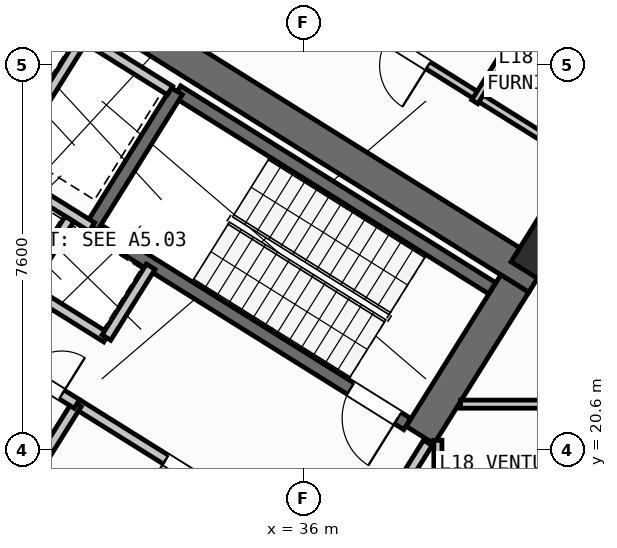
"""IFC4 building model, lengths in metres.
Left out: names, types, materials, properties, quantities, classifications, styles, units other than length and angle.
Written with IfcOpenShell. Run it as: python <this file> out.ifc"""

import sys

from ifc_helpers import new_model, si_unit, direction, frame, frame_2d, origin, origin_2d, place, context, subcontext, project, spatial, rectangle, hollow_rectangle, extrude, source, transform, mapped, element, fill, save


model = new_model("IFC4")
c1 = context("Model", 3, precision=1e-05, world=origin(), true_north=direction((0.0, 1.0)))
c2 = subcontext(c1, "Body", "Model", "MODEL_VIEW")
j1 = project(units=[si_unit("LENGTHUNIT", "METRE"), si_unit("PLANEANGLEUNIT", "RADIAN")], contexts=[c1])
p1 = place(None, origin())
s1 = spatial("IfcSite", under=j1, at=p1, CompositionType="ELEMENT")
p2 = place(p1, origin())
s2 = spatial("IfcBuilding", under=s1, at=p2, CompositionType="ELEMENT")
p3 = place(p2, frame((0.0, 0.0, 71.7)))
s3 = spatial("IfcBuildingStorey", under=s2, at=p3, CompositionType="ELEMENT", Elevation=71.7)
p4 = place(p3, frame((40.615, 23.983, 0.0), z_axis=(0.0, 0.0, 1.0), x_axis=(-0.848045953968, 0.529922692436, 0.0)))
e1 = element("IfcWall", 1, at=p4, inside=s3, PredefinedType="SHEAR", context=c2, shape_type="SweptSolid", body=[
    extrude(rectangle(XDim=13.24, YDim=0.65, at=frame_2d((6.62, 0.0))), origin(), (0.0, 0.0, 1.0), 4.52),
])
p5 = place(p3, frame((40.168, 23.88, 0.0), z_axis=(0.0, 0.0, 1.0), x_axis=(-0.529893103397, -0.8480644427, 0.0)))
e2 = element("IfcWall", 2, at=p5, inside=s3, PredefinedType="SHEAR", context=c2, shape_type="SweptSolid", body=[
    extrude(rectangle(XDim=3.525, YDim=0.65, at=frame_2d((1.763, 0.0))), origin(), (0.0, 0.0, 1.0), 4.52),
])
m1 = source(origin(), c2, "Body", "SweptSolid", [
    extrude(hollow_rectangle(XDim=1.0, YDim=1.0, WallThickness=0.04, at=origin_2d()), origin(), (0.0, 0.0, 1.0), 4.8),
])
p6 = place(p3, frame((40.783, 24.469, 0.0), z_axis=(0.0, 0.0, 1.0), x_axis=(-0.848048096156, 0.529919264233, 0.0)))
e3 = element("IfcColumn", 3, at=p6, inside=s3, PredefinedType="COLUMN", context=c2, shape_type="MappedRepresentation", body=[
    mapped(m1, transform((0.0, 0.0, 0.0), scale=1.0)),
])
p7 = place(p3, frame((31.76, 12.183, 0.0), z_axis=(0.0, 0.0, 1.0), x_axis=(-0.848047074256, 0.529920899612, 0.0)))
e4 = element("IfcWall", 4, at=p7, inside=s3, PredefinedType="STANDARD", context=c2, shape_type="SweptSolid", body=[
    extrude(rectangle(XDim=30.652, YDim=0.32, at=frame_2d((15.326, 0.0))), origin(), (0.0, 0.0, 1.0), 4.52),
])
p8 = place(p7, frame((20.241, 0.0, 0.0)))
e5 = element("IfcOpeningElement", 5, at=p8, cuts=e4, PredefinedType="OPENING", context=c2, shape_type="SweptSolid", body=[
    extrude(rectangle(XDim=1.2, YDim=2.15, at=frame_2d((0.6, 1.075))), frame((0.0, 0.17, 0.0), z_axis=(0.0, -1.0, 0.0), x_axis=(1.0, 0.0, 0.0)), (0.0, 0.0, 1.0), 0.34),
])
p9 = place(p7, frame((14.781, 0.0, 0.0)))
e6 = element("IfcOpeningElement", 6, at=p9, cuts=e4, PredefinedType="OPENING", context=c2, shape_type="SweptSolid", body=[
    extrude(rectangle(XDim=1.5, YDim=2.25, at=frame_2d((0.75, 1.125))), frame((0.0, 0.17, 0.0), z_axis=(0.0, -1.0, 0.0), x_axis=(1.0, 0.0, 0.0)), (0.0, 0.0, 1.0), 0.34),
])
p10 = place(p7, frame((1.84, 0.0, 0.75)))
e7 = element("IfcOpeningElement", 7, at=p10, cuts=e4, PredefinedType="OPENING", context=c2, shape_type="SweptSolid", body=[
    extrude(rectangle(XDim=2.4, YDim=1.6, at=frame_2d((1.2, 0.8))), frame((0.0, 0.17, 0.0), z_axis=(0.0, -1.0, 0.0), x_axis=(1.0, 0.0, 0.0)), (0.0, 0.0, 1.0), 0.34),
])
p11 = place(p7, frame((7.019, 0.0, 0.75)))
e8 = element("IfcOpeningElement", 8, at=p11, cuts=e4, PredefinedType="OPENING", context=c2, shape_type="SweptSolid", body=[
    extrude(rectangle(XDim=2.4, YDim=1.6, at=frame_2d((1.2, 0.8))), frame((0.0, 0.17, 0.0), z_axis=(0.0, -1.0, 0.0), x_axis=(1.0, 0.0, 0.0)), (0.0, 0.0, 1.0), 0.34),
])
p12 = place(p7, frame((25.841, 0.0, 0.95)))
e9 = element("IfcOpeningElement", 9, at=p12, cuts=e4, PredefinedType="OPENING", context=c2, shape_type="SweptSolid", body=[
    extrude(rectangle(XDim=1.2, YDim=1.4, at=frame_2d((0.6, 0.7))), frame((0.0, 0.17, 0.0), z_axis=(0.0, -1.0, 0.0), x_axis=(1.0, 0.0, 0.0)), (0.0, 0.0, 1.0), 0.34),
])
p13 = place(p3, frame((31.28, 18.261, 0.0), z_axis=(0.0, 0.0, 1.0), x_axis=(-0.848051618787, 0.529913626805, 0.0)))
e10 = element("IfcWall", 10, at=p13, inside=s3, PredefinedType="SHEAR", context=c2, shape_type="SweptSolid", body=[
    extrude(rectangle(XDim=7.46, YDim=0.26, at=frame_2d((3.73, 0.0))), origin(), (0.0, 0.0, 1.0), 4.52),
])
p14 = place(p13, frame((0.36, 0.0, 0.0)))
e11 = element("IfcOpeningElement", 11, at=p14, cuts=e10, PredefinedType="OPENING", context=c2, shape_type="SweptSolid", body=[
    extrude(rectangle(XDim=0.86, YDim=2.05, at=frame_2d((0.43, 1.025))), frame((0.0, 0.14, 0.0), z_axis=(0.0, -1.0, 0.0), x_axis=(1.0, 0.0, 0.0)), (0.0, 0.0, 1.0), 0.28),
])
p15 = place(p3, frame((39.721, 23.788, 0.0), z_axis=(0.0, 0.0, 1.0), x_axis=(-0.848054434086, 0.529909121291, 0.0)))
e12 = element("IfcWall", 12, at=p15, inside=s3, PredefinedType="SHEAR", context=c2, shape_type="SweptSolid", body=[
    extrude(rectangle(XDim=7.33, YDim=0.26, at=frame_2d((3.665, 0.0))), origin(), (0.0, 0.0, 1.0), 4.52),
])
p16 = place(p3, frame((38.046, 21.108, 0.0), z_axis=(0.0, 0.0, 1.0), x_axis=(-0.848054434086, 0.529909121291, 0.0)))
e13 = element("IfcWall", 13, at=p16, inside=s3, PredefinedType="SHEAR", context=c2, shape_type="SweptSolid", body=[
    extrude(rectangle(XDim=7.33, YDim=0.26, at=frame_2d((3.665, 0.0))), origin(), (0.0, 0.0, 1.0), 4.52),
])
p17 = place(p16, frame((0.22, 0.0, 0.0)))
e14 = element("IfcOpeningElement", 14, at=p17, cuts=e13, PredefinedType="OPENING", context=c2, shape_type="SweptSolid", body=[
    extrude(rectangle(XDim=1.1, YDim=2.1, at=frame_2d((0.55, 1.05))), frame((0.0, 0.14, 0.0), z_axis=(0.0, -1.0, 0.0), x_axis=(1.0, 0.0, 0.0)), (0.0, 0.0, 1.0), 0.28),
])
p18 = place(p3, frame((33.496, 27.677, 0.0), z_axis=(0.0, 0.0, 1.0), x_axis=(-0.529908658664, -0.84805472316, 0.0)))
e15 = element("IfcWall", 15, at=p18, inside=s3, PredefinedType="SHEAR", context=c2, shape_type="SweptSolid", body=[
    extrude(rectangle(XDim=3.16, YDim=0.26, at=frame_2d((1.58, 0.0))), origin(), (0.0, 0.0, 1.0), 4.52),
])
p19 = place(p3, frame((36.374, 18.474, 0.0), z_axis=(0.0, 0.0, 1.0), x_axis=(-0.848051071577, 0.529914502535, 0.0)))
e16 = element("IfcWall", 16, at=p19, inside=s3, PredefinedType="STANDARD", context=c2, shape_type="SweptSolid", body=[
    extrude(rectangle(XDim=5.718, YDim=0.2, at=frame_2d((2.859, 0.0))), origin(), (0.0, 0.0, 1.0), 4.51),
])
p20 = place(p19, frame((2.498, 0.0, 0.0)))
e17 = element("IfcOpeningElement", 17, at=p20, cuts=e16, PredefinedType="OPENING", context=c2, shape_type="SweptSolid", body=[
    extrude(rectangle(XDim=1.15, YDim=2.1, at=frame_2d((0.575, 1.05))), frame((0.0, 0.11, 0.0), z_axis=(0.0, -1.0, 0.0), x_axis=(1.0, 0.0, 0.0)), (0.0, 0.0, 1.0), 0.22),
])
p21 = place(p3, frame((31.822, 24.998, 0.0), z_axis=(0.0, 0.0, 1.0), x_axis=(-0.848058348634, 0.529902856485, 0.0)))
e18 = element("IfcWall", 18, at=p21, inside=s3, PredefinedType="STANDARD", context=c2, shape_type="SweptSolid", body=[
    extrude(rectangle(XDim=4.568, YDim=0.2, at=frame_2d((2.284, 0.0))), origin(), (0.0, 0.0, 1.0), 4.51),
])
p22 = place(p3, frame((32.108, 22.814, 0.0), z_axis=(0.0, 0.0, 1.0), x_axis=(-0.848042229521, 0.529928652696, 0.0)))
e19 = element("IfcWall", 19, at=p22, inside=s3, PredefinedType="STANDARD", context=c2, shape_type="SweptSolid", body=[
    extrude(rectangle(XDim=5.62, YDim=0.2, at=frame_2d((2.81, 0.0))), origin(), (0.0, 0.0, 1.0), 4.51),
])
p23 = place(p3, frame((32.982, 24.213, 0.0), z_axis=(0.0, 0.0, 1.0), x_axis=(-0.529839334948, -0.84809803628, 0.0)))
e20 = element("IfcWall", 20, at=p23, inside=s3, PredefinedType="STANDARD", context=c2, shape_type="SweptSolid", body=[
    extrude(rectangle(XDim=1.65, YDim=0.2, at=frame_2d((0.825, 0.0))), origin(), (0.0, 0.0, 1.0), 4.51),
])
p24 = place(p3, frame((31.645, 28.716, 0.0), z_axis=(0.0, 0.0, 1.0), x_axis=(-0.52986693015, -0.848080795876, 0.0)))
e21 = element("IfcWall", 21, at=p24, inside=s3, PredefinedType="STANDARD", context=c2, shape_type="SweptSolid", body=[
    extrude(rectangle(XDim=2.66, YDim=0.2, at=frame_2d((1.33, 0.0))), origin(), (0.0, 0.0, 1.0), 4.51),
])
p25 = place(p3, frame((33.363, 27.69, 0.0), z_axis=(0.0, 0.0, 1.0), x_axis=(-0.848053806312, 0.529910125964, 0.0)))
e22 = element("IfcWall", 22, at=p25, inside=s3, PredefinedType="STANDARD", context=c2, shape_type="SweptSolid", body=[
    extrude(rectangle(XDim=4.448, YDim=0.2, at=frame_2d((2.224, 0.0))), origin(), (0.0, 0.0, 1.0), 4.51),
])
p26 = place(p3, frame((31.379, 25.156, 0.0), z_axis=(0.0, 0.0, 1.0), x_axis=(-0.529998940003, -0.847998304005, 0.0)))
e23 = element("IfcWall", 23, at=p26, inside=s3, PredefinedType="STANDARD", context=c2, shape_type="SweptSolid", body=[
    extrude(rectangle(XDim=1.58, YDim=0.2, at=frame_2d((0.79, 0.0))), origin(), (0.0, 0.0, 1.0), 4.51),
])
p27 = place(p3, frame((31.525, 21.504, 0.0), z_axis=(0.0, 0.0, 1.0), x_axis=(-0.529907497854, -0.848055448493, 0.0)))
e24 = element("IfcWall", 24, at=p27, inside=s3, PredefinedType="STANDARD", context=c2, shape_type="SweptSolid", body=[
    extrude(rectangle(XDim=2.88, YDim=0.2, at=frame_2d((1.44, 0.0))), origin(), (0.0, 0.0, 1.0), 4.51),
])
p28 = place(p3, frame((31.525, 21.504, 0.0), z_axis=(0.0, 0.0, 1.0), x_axis=(-0.848044998614, 0.529924221305, 0.0)))
e25 = element("IfcWall", 25, at=p28, inside=s3, PredefinedType="STANDARD", context=c2, shape_type="SweptSolid", body=[
    extrude(rectangle(XDim=6.168, YDim=0.2, at=frame_2d((3.084, 0.0))), origin(), (0.0, 0.0, 1.0), 4.51),
])
p29 = place(p28, frame((4.4, 0.0, 0.0)))
e26 = element("IfcOpeningElement", 26, at=p29, cuts=e25, PredefinedType="OPENING", context=c2, shape_type="SweptSolid", body=[
    extrude(rectangle(XDim=0.86, YDim=2.05, at=frame_2d((0.43, 1.025))), frame((0.0, 0.11, 0.0), z_axis=(0.0, -1.0, 0.0), x_axis=(1.0, 0.0, 0.0)), (0.0, 0.0, 1.0), 0.22),
])
p30 = place(p28, frame((0.35, 0.0, 0.0)))
e27 = element("IfcOpeningElement", 27, at=p30, cuts=e25, PredefinedType="OPENING", context=c2, shape_type="SweptSolid", body=[
    extrude(rectangle(XDim=0.86, YDim=2.05, at=frame_2d((0.43, 1.025))), frame((0.0, 0.11, 0.0), z_axis=(0.0, -1.0, 0.0), x_axis=(1.0, 0.0, 0.0)), (0.0, 0.0, 1.0), 0.22),
])
p31 = place(p3, frame((41.936, 26.012, 0.0), z_axis=(0.0, 0.0, 1.0), x_axis=(-0.848051154596, 0.529914369676, 0.0)))
e28 = element("IfcWall", 28, at=p31, inside=s3, PredefinedType="PARTITIONING", context=c2, shape_type="SweptSolid", body=[
    extrude(rectangle(XDim=15.57, YDim=0.16, at=frame_2d((7.785, 0.0))), origin(), (0.0, 0.0, 1.0), 4.51),
])
p32 = place(p31, frame((4.1, 0.0, 0.0)))
e29 = element("IfcOpeningElement", 29, at=p32, cuts=e28, PredefinedType="OPENING", context=c2, shape_type="SweptSolid", body=[
    extrude(rectangle(XDim=0.96, YDim=2.08, at=frame_2d((0.48, 1.04))), frame((0.0, 0.09, 0.0), z_axis=(0.0, -1.0, 0.0), x_axis=(1.0, 0.0, 0.0)), (0.0, 0.0, 1.0), 0.18),
])
p33 = place(p31, frame((8.2, 0.0, 0.0)))
e30 = element("IfcOpeningElement", 30, at=p33, cuts=e28, PredefinedType="OPENING", context=c2, shape_type="SweptSolid", body=[
    extrude(rectangle(XDim=1.7, YDim=2.2, at=frame_2d((0.85, 1.1))), frame((0.0, 0.09, 0.0), z_axis=(0.0, -1.0, 0.0), x_axis=(1.0, 0.0, 0.0)), (0.0, 0.0, 1.0), 0.18),
])
p34 = place(p3, frame((40.512, 29.281, 0.0), z_axis=(0.0, 0.0, 1.0), x_axis=(-0.529947607416, -0.848030384712, 0.0)))
e31 = element("IfcWall", 31, at=p34, inside=s3, PredefinedType="PLUMBINGWALL", context=c2, shape_type="SweptSolid", body=[
    extrude(rectangle(XDim=2.138, YDim=0.14, at=frame_2d((1.069, 0.0))), origin(), (0.0, 0.0, 1.0), 4.51),
])
p35 = place(p3, frame((38.451, 20.737, 0.0), z_axis=(0.0, 0.0, 1.0), x_axis=(-0.529924799939, -0.848044637038, 0.0)))
e32 = element("IfcWall", 32, at=p35, inside=s3, PredefinedType="STANDARD", context=c2, shape_type="SweptSolid", body=[
    extrude(rectangle(XDim=2.96, YDim=0.2, at=frame_2d((1.48, 0.0))), origin(), (0.0, 0.0, 1.0), 4.51),
])
p36 = place(p35, frame((1.46, 0.0, 0.0)))
e33 = element("IfcOpeningElement", 33, at=p36, cuts=e32, PredefinedType="OPENING", context=c2, shape_type="SweptSolid", body=[
    extrude(rectangle(XDim=0.86, YDim=2.05, at=frame_2d((0.43, 1.025))), frame((0.0, 0.11, 0.0), z_axis=(0.0, -1.0, 0.0), x_axis=(1.0, 0.0, 0.0)), (0.0, 0.0, 1.0), 0.22),
])
p37 = place(p3, frame((38.65, 17.93, 0.0), z_axis=(0.0, 0.0, 1.0), x_axis=(0.0, 1.0, 0.0)))
e34 = element("IfcWall", 34, at=p37, inside=s3, PredefinedType="PARTITIONING", context=c2, shape_type="SweptSolid", body=[
    extrude(rectangle(XDim=2.857, YDim=0.16, at=frame_2d((1.428, 0.0))), origin(), (0.0, 0.0, 1.0), 4.51),
])
p38 = place(p3, frame((39.095, 21.5, 0.0), z_axis=(0.0, 0.0, 1.0), x_axis=(1.0, 0.0, 0.0)))
e35 = element("IfcWall", 35, at=p38, inside=s3, PredefinedType="PARTITIONING", context=c2, shape_type="SweptSolid", body=[
    extrude(rectangle(XDim=7.094, YDim=0.16, at=frame_2d((3.547, 0.0))), origin(), (0.0, 0.0, 1.0), 4.51),
])
m2 = source(origin(), c2, "Body", "SweptSolid", [
    extrude(rectangle(XDim=1.1, YDim=2.1, at=frame_2d((0.55, 1.05))), frame((0.0, 0.025, 0.0), z_axis=(0.0, -1.0, 0.0), x_axis=(1.0, 0.0, 0.0)), (0.0, 0.0, 1.0), 0.05),
])
p39 = place(p17, origin())
e36 = element("IfcDoor", 36, at=p39, inside=s3, OperationType="SINGLE_SWING_LEFT", PredefinedType="DOOR", context=c2, shape_type="MappedRepresentation", body=[
    mapped(m2, transform((0.0, 0.0, 0.0), scale=1.0)),
])
fill(e14, e36)
m3 = source(origin(), c2, "Body", "SweptSolid", [
    extrude(rectangle(XDim=1.15, YDim=2.1, at=frame_2d((0.575, 1.05))), frame((0.0, 0.025, 0.0), z_axis=(0.0, -1.0, 0.0), x_axis=(1.0, 0.0, 0.0)), (0.0, 0.0, 1.0), 0.05),
])
p40 = place(p20, origin())
e37 = element("IfcDoor", 37, at=p40, inside=s3, OperationType="SINGLE_SWING_RIGHT", PredefinedType="DOOR", context=c2, shape_type="MappedRepresentation", body=[
    mapped(m3, transform((0.0, 0.0, 0.0), scale=1.0)),
])
fill(e17, e37)
m4 = source(origin(), c2, "Body", "SweptSolid", [
    extrude(rectangle(XDim=0.86, YDim=2.05, at=frame_2d((0.43, 1.025))), frame((0.0, 0.025, 0.0), z_axis=(0.0, -1.0, 0.0), x_axis=(1.0, 0.0, 0.0)), (0.0, 0.0, 1.0), 0.05),
])
p41 = place(p30, frame((0.86, 0.0, 0.0), z_axis=(0.0, 0.0, 1.0), x_axis=(-1.0, 0.0, 0.0)))
e38 = element("IfcDoor", 38, at=p41, inside=s3, OperationType="SINGLE_SWING_RIGHT", PredefinedType="DOOR", context=c2, shape_type="MappedRepresentation", body=[
    mapped(m4, transform((0.0, 0.0, 0.0), scale=1.0)),
])
fill(e27, e38)
m5 = source(origin(), c2, "Body", "SweptSolid", [
    extrude(rectangle(XDim=0.96, YDim=2.08, at=frame_2d((0.48, 1.04))), frame((0.0, 0.025, 0.0), z_axis=(0.0, -1.0, 0.0), x_axis=(1.0, 0.0, 0.0)), (0.0, 0.0, 1.0), 0.05),
])
p42 = place(p32, origin())
e39 = element("IfcDoor", 39, at=p42, inside=s3, OperationType="SINGLE_SWING_LEFT", PredefinedType="DOOR", context=c2, shape_type="MappedRepresentation", body=[
    mapped(m5, transform((0.0, 0.0, 0.0), scale=1.0)),
])
fill(e29, e39)
save(model, sys.argv[1])
